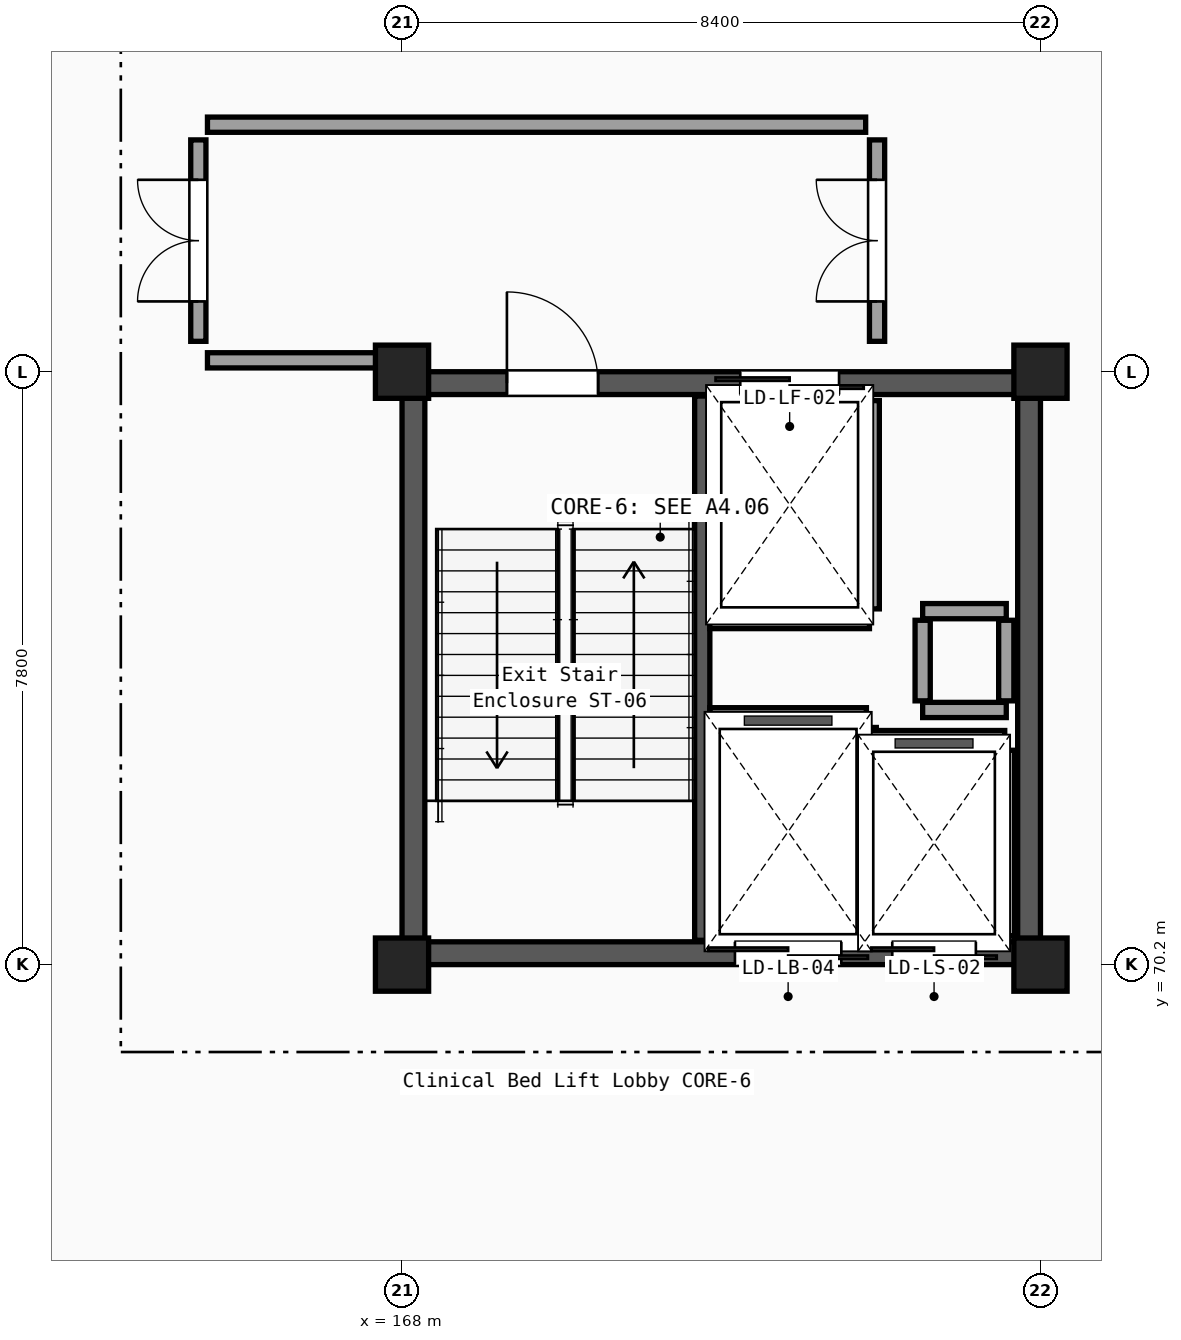
"""IFC4 building model, lengths in metres.
Left out: names, types, materials, properties, quantities, classifications, styles, units other than length and angle.
Written with IfcOpenShell. Run it as: python <this file> out.ifc"""

import sys

from ifc_helpers import new_model, si_unit, direction, frame, frame_2d, origin, origin_2d, place, context, subcontext, project, spatial, rectangle, i_section, extrude, element, fill, save


model = new_model("IFC4")
c1 = context("Model", 3, precision=1e-05, world=origin(), true_north=direction((0.0, 1.0)))
c2 = subcontext(c1, "Body", "Model", "MODEL_VIEW")
j1 = project(units=[si_unit("LENGTHUNIT", "METRE"), si_unit("PLANEANGLEUNIT", "RADIAN")], contexts=[c1])
p1 = place(None, origin())
s1 = spatial("IfcSite", under=j1, at=p1, CompositionType="ELEMENT")
p2 = place(p1, origin())
s2 = spatial("IfcBuilding", under=s1, at=p2, CompositionType="ELEMENT")
p3 = place(p2, frame((0.0, 0.0, -5.1)))
s3 = spatial("IfcBuildingStorey", under=s2, at=p3, CompositionType="ELEMENT", Elevation=-5.1)
for number, where, z_axis, x_axis in (
    (1, (168.0, 70.2, -0.22), (0.0, 0.0, 1.0), (1.0, 0.0, 0.0)),
    (2, (168.0, 78.0, -0.22), (0.0, 0.0, 1.0), (1.0, 0.0, 0.0)),
    (3, (176.4, 70.2, -0.22), (0.0, 0.0, 1.0), (1.0, 0.0, 0.0)),
    (4, (176.4, 78.0, -0.22), (0.0, 0.0, 1.0), (1.0, 0.0, 0.0)),
):
    element("IfcColumn", number, at=place(p3, frame(where, z_axis=z_axis, x_axis=x_axis)), inside=s3, PredefinedType="COLUMN", context=c2, shape_type="SweptSolid", body=[
        extrude(i_section(OverallWidth=0.3, OverallDepth=0.7, WebThickness=0.017, FlangeThickness=0.032, FilletRadius=0.027, at=origin_2d()), origin(), (0.0, 0.0, 1.0), 5.32),
    ])
p4 = place(p3, frame((168.0, 70.35, -0.22), z_axis=(0.0, 0.0, 1.0), x_axis=(1.0, 0.0, 0.0)))
e5 = element("IfcWall", 5, at=p4, inside=s3, PredefinedType="SHEAR", context=c2, shape_type="SweptSolid", body=[
    extrude(rectangle(XDim=8.4, YDim=0.3, at=frame_2d((4.2, 0.0))), origin(), (0.0, 0.0, 1.0), 5.07),
])
p5 = place(p4, frame((4.38, 0.0, 0.22)))
e6 = element("IfcOpeningElement", 6, at=p5, cuts=e5, PredefinedType="OPENING", context=c2, shape_type="SweptSolid", body=[
    extrude(rectangle(XDim=1.4, YDim=2.2, at=frame_2d((0.7, 1.1))), frame((0.0, 0.16, 0.0), z_axis=(0.0, -1.0, 0.0), x_axis=(1.0, 0.0, 0.0)), (0.0, 0.0, 1.0), 0.32),
])
p6 = place(p4, frame((6.45, 0.0, 0.22)))
e7 = element("IfcOpeningElement", 7, at=p6, cuts=e5, PredefinedType="OPENING", context=c2, shape_type="SweptSolid", body=[
    extrude(rectangle(XDim=1.1, YDim=2.15, at=frame_2d((0.55, 1.075))), frame((0.0, 0.16, 0.0), z_axis=(0.0, -1.0, 0.0), x_axis=(1.0, 0.0, 0.0)), (0.0, 0.0, 1.0), 0.32),
])
p7 = place(p3, frame((168.0, 77.85, -0.22), z_axis=(0.0, 0.0, 1.0), x_axis=(1.0, 0.0, 0.0)))
e8 = element("IfcWall", 8, at=p7, inside=s3, PredefinedType="SHEAR", context=c2, shape_type="SweptSolid", body=[
    extrude(rectangle(XDim=8.4, YDim=0.3, at=frame_2d((4.2, 0.0))), origin(), (0.0, 0.0, 1.0), 5.07),
])
p8 = place(p7, frame((1.38, 0.0, 0.22)))
e9 = element("IfcOpeningElement", 9, at=p8, cuts=e8, PredefinedType="OPENING", context=c2, shape_type="SweptSolid", body=[
    extrude(rectangle(XDim=1.2, YDim=2.15, at=frame_2d((0.6, 1.075))), frame((0.0, 0.16, 0.0), z_axis=(0.0, -1.0, 0.0), x_axis=(1.0, 0.0, 0.0)), (0.0, 0.0, 1.0), 0.32),
])
p9 = place(p7, frame((4.45, 0.0, 0.22)))
e10 = element("IfcOpeningElement", 10, at=p9, cuts=e8, PredefinedType="OPENING", context=c2, shape_type="SweptSolid", body=[
    extrude(rectangle(XDim=1.3, YDim=2.2, at=frame_2d((0.65, 1.1))), frame((0.0, 0.16, 0.0), z_axis=(0.0, -1.0, 0.0), x_axis=(1.0, 0.0, 0.0)), (0.0, 0.0, 1.0), 0.32),
])
for number, where, z_axis, x_axis in (
    (11, (168.15, 70.5, -0.22), (0.0, 0.0, 1.0), (0.0, 1.0, 0.0)),
    (12, (176.25, 70.5, -0.22), (0.0, 0.0, 1.0), (0.0, 1.0, 0.0)),
):
    element("IfcWall", number, at=place(p3, frame(where, z_axis=z_axis, x_axis=x_axis)), inside=s3, PredefinedType="SHEAR", context=c2, shape_type="SweptSolid", body=[
        extrude(rectangle(XDim=7.2, YDim=0.3, at=frame_2d((3.6, 0.0))), origin(), (0.0, 0.0, 1.0), 5.07),
    ])
p10 = place(p3, frame((171.95, 70.52, -0.22), z_axis=(0.0, 0.0, 1.0), x_axis=(0.0, 1.0, 0.0)))
e13 = element("IfcWall", 13, at=p10, inside=s3, PredefinedType="SHEAR", context=c2, shape_type="SweptSolid", body=[
    extrude(rectangle(XDim=7.16, YDim=0.2, at=frame_2d((3.58, 0.0))), origin(), (0.0, 0.0, 1.0), 5.07),
])
for number, where, z_axis, x_axis in (
    (14, (174.85, 73.55, 0.0), (0.0, 0.0, 1.0), (1.0, 0.0, 0.0)),
    (15, (174.85, 74.85, 0.0), (0.0, 0.0, 1.0), (1.0, 0.0, 0.0)),
):
    element("IfcWall", number, at=place(p3, frame(where, z_axis=z_axis, x_axis=x_axis)), inside=s3, PredefinedType="PARTITIONING", context=c2, shape_type="SweptSolid", body=[
        extrude(rectangle(XDim=1.1, YDim=0.2, at=frame_2d((0.55, 0.0))), origin(), (0.0, 0.0, 1.0), 4.33),
    ])
for number, where, z_axis, x_axis in (
    (16, (174.85, 73.67, 0.0), (0.0, 0.0, 1.0), (0.0, 1.0, 0.0)),
    (17, (175.95, 73.67, 0.0), (0.0, 0.0, 1.0), (0.0, 1.0, 0.0)),
):
    element("IfcWall", number, at=place(p3, frame(where, z_axis=z_axis, x_axis=x_axis)), inside=s3, PredefinedType="PARTITIONING", context=c2, shape_type="SweptSolid", body=[
        extrude(rectangle(XDim=1.06, YDim=0.2, at=frame_2d((0.53, 0.0))), origin(), (0.0, 0.0, 1.0), 4.33),
    ])
p11 = place(p3, frame((174.18, 74.88, 0.0), z_axis=(0.0, 0.0, 1.0), x_axis=(0.0, 1.0, 0.0)))
e18 = element("IfcWall", 18, at=p11, inside=s3, PredefinedType="PARTITIONING", context=c2, shape_type="SweptSolid", body=[
    extrude(rectangle(XDim=2.74, YDim=0.2, at=frame_2d((1.37, 0.0))), origin(), (0.0, 0.0, 1.0), 4.33),
])
p12 = place(p3, frame((172.05, 74.72, 0.0), z_axis=(0.0, 0.0, 1.0), x_axis=(1.0, 0.0, 0.0)))
e19 = element("IfcWall", 19, at=p12, inside=s3, PredefinedType="PARTITIONING", context=c2, shape_type="SweptSolid", body=[
    extrude(rectangle(XDim=2.1, YDim=0.2, at=frame_2d((1.05, 0.0))), origin(), (0.0, 0.0, 1.0), 4.33),
])
p13 = place(p3, frame((174.14, 70.58, 0.0), z_axis=(0.0, 0.0, 1.0), x_axis=(0.0, 1.0, 0.0)))
e20 = element("IfcWall", 20, at=p13, inside=s3, PredefinedType="PARTITIONING", context=c2, shape_type="SweptSolid", body=[
    extrude(rectangle(XDim=2.74, YDim=0.2, at=frame_2d((1.37, 0.0))), origin(), (0.0, 0.0, 1.0), 4.33),
])
p14 = place(p3, frame((172.05, 73.48, 0.0), z_axis=(0.0, 0.0, 1.0), x_axis=(1.0, 0.0, 0.0)))
e21 = element("IfcWall", 21, at=p14, inside=s3, PredefinedType="PARTITIONING", context=c2, shape_type="SweptSolid", body=[
    extrude(rectangle(XDim=2.06, YDim=0.2, at=frame_2d((1.03, 0.0))), origin(), (0.0, 0.0, 1.0), 4.33),
])
p15 = place(p3, frame((175.96, 70.58, 0.0), z_axis=(0.0, 0.0, 1.0), x_axis=(0.0, 1.0, 0.0)))
e22 = element("IfcWall", 22, at=p15, inside=s3, PredefinedType="PARTITIONING", context=c2, shape_type="SweptSolid", body=[
    extrude(rectangle(XDim=2.44, YDim=0.2, at=frame_2d((1.22, 0.0))), origin(), (0.0, 0.0, 1.0), 4.33),
])
p16 = place(p3, frame((174.07, 73.18, 0.0), z_axis=(0.0, 0.0, 1.0), x_axis=(1.0, 0.0, 0.0)))
e23 = element("IfcWall", 23, at=p16, inside=s3, PredefinedType="PARTITIONING", context=c2, shape_type="SweptSolid", body=[
    extrude(rectangle(XDim=1.86, YDim=0.2, at=frame_2d((0.93, 0.0))), origin(), (0.0, 0.0, 1.0), 4.33),
])
p17 = place(p3, frame((165.44, 78.15, 0.0), z_axis=(0.0, 0.0, 1.0), x_axis=(1.0, 0.0, 0.0)))
e24 = element("IfcWall", 24, at=p17, inside=s3, PredefinedType="PARTITIONING", context=c2, shape_type="SweptSolid", body=[
    extrude(rectangle(XDim=2.44, YDim=0.2, at=frame_2d((1.22, 0.0))), origin(), (0.0, 0.0, 1.0), 4.33),
])
p18 = place(p3, frame((165.44, 81.25, 0.0), z_axis=(0.0, 0.0, 1.0), x_axis=(1.0, 0.0, 0.0)))
e25 = element("IfcWall", 25, at=p18, inside=s3, PredefinedType="PARTITIONING", context=c2, shape_type="SweptSolid", body=[
    extrude(rectangle(XDim=8.66, YDim=0.2, at=frame_2d((4.33, 0.0))), origin(), (0.0, 0.0, 1.0), 4.33),
])
p19 = place(p3, frame((165.32, 78.4, 0.0), z_axis=(0.0, 0.0, 1.0), x_axis=(0.0, 1.0, 0.0)))
e26 = element("IfcWall", 26, at=p19, inside=s3, PredefinedType="PARTITIONING", context=c2, shape_type="SweptSolid", body=[
    extrude(rectangle(XDim=2.65, YDim=0.2, at=frame_2d((1.325, 0.0))), origin(), (0.0, 0.0, 1.0), 4.33),
])
p20 = place(p19, frame((0.525, 0.0, 0.0)))
e27 = element("IfcOpeningElement", 27, at=p20, cuts=e26, PredefinedType="OPENING", context=c2, shape_type="SweptSolid", body=[
    extrude(rectangle(XDim=1.6, YDim=2.2, at=frame_2d((0.8, 1.1))), frame((0.0, 0.11, 0.0), z_axis=(0.0, -1.0, 0.0), x_axis=(1.0, 0.0, 0.0)), (0.0, 0.0, 1.0), 0.22),
])
p21 = place(p3, frame((174.25, 78.4, 0.0), z_axis=(0.0, 0.0, 1.0), x_axis=(0.0, 1.0, 0.0)))
e28 = element("IfcWall", 28, at=p21, inside=s3, PredefinedType="PARTITIONING", context=c2, shape_type="SweptSolid", body=[
    extrude(rectangle(XDim=2.65, YDim=0.2, at=frame_2d((1.325, 0.0))), origin(), (0.0, 0.0, 1.0), 4.33),
])
p22 = place(p21, frame((0.525, 0.0, 0.0)))
e29 = element("IfcOpeningElement", 29, at=p22, cuts=e28, PredefinedType="OPENING", context=c2, shape_type="SweptSolid", body=[
    extrude(rectangle(XDim=1.6, YDim=2.2, at=frame_2d((0.8, 1.1))), frame((0.0, 0.11, 0.0), z_axis=(0.0, -1.0, 0.0), x_axis=(1.0, 0.0, 0.0)), (0.0, 0.0, 1.0), 0.22),
])
p23 = place(p8, origin())
e30 = element("IfcDoor", 30, at=p23, inside=s3, OperationType="SINGLE_SWING_LEFT", PredefinedType="DOOR", context=c2, shape_type="SweptSolid", body=[
    extrude(rectangle(XDim=1.2, YDim=2.15, at=frame_2d((0.6, 1.075))), frame((0.0, 0.025, 0.0), z_axis=(0.0, -1.0, 0.0), x_axis=(1.0, 0.0, 0.0)), (0.0, 0.0, 1.0), 0.05),
])
fill(e9, e30)
p24 = place(p9, origin())
e31 = element("IfcDoor", 31, at=p24, inside=s3, OperationType="DOUBLE_DOOR_SLIDING", PredefinedType="DOOR", context=c2, shape_type="SweptSolid", body=[
    extrude(rectangle(XDim=1.3, YDim=2.2, at=frame_2d((0.65, 1.1))), frame((0.0, 0.025, 0.0), z_axis=(0.0, -1.0, 0.0), x_axis=(1.0, 0.0, 0.0)), (0.0, 0.0, 1.0), 0.05),
])
fill(e10, e31)
p25 = place(p5, origin())
e32 = element("IfcDoor", 32, at=p25, inside=s3, OperationType="DOUBLE_DOOR_SLIDING", PredefinedType="DOOR", context=c2, shape_type="SweptSolid", body=[
    extrude(rectangle(XDim=1.4, YDim=2.2, at=frame_2d((0.7, 1.1))), frame((0.0, 0.025, 0.0), z_axis=(0.0, -1.0, 0.0), x_axis=(1.0, 0.0, 0.0)), (0.0, 0.0, 1.0), 0.05),
])
fill(e6, e32)
p26 = place(p6, origin())
e33 = element("IfcDoor", 33, at=p26, inside=s3, OperationType="DOUBLE_DOOR_SLIDING", PredefinedType="DOOR", context=c2, shape_type="SweptSolid", body=[
    extrude(rectangle(XDim=1.1, YDim=2.15, at=frame_2d((0.55, 1.075))), frame((0.0, 0.025, 0.0), z_axis=(0.0, -1.0, 0.0), x_axis=(1.0, 0.0, 0.0)), (0.0, 0.0, 1.0), 0.05),
])
fill(e7, e33)
p27 = place(p20, origin())
e34 = element("IfcDoor", 34, at=p27, inside=s3, OperationType="DOUBLE_DOOR_SINGLE_SWING", PredefinedType="DOOR", context=c2, shape_type="SweptSolid", body=[
    extrude(rectangle(XDim=1.6, YDim=2.2, at=frame_2d((0.8, 1.1))), frame((0.0, 0.025, 0.0), z_axis=(0.0, -1.0, 0.0), x_axis=(1.0, 0.0, 0.0)), (0.0, 0.0, 1.0), 0.05),
])
fill(e27, e34)
p28 = place(p22, origin())
e35 = element("IfcDoor", 35, at=p28, inside=s3, OperationType="DOUBLE_DOOR_SINGLE_SWING", PredefinedType="DOOR", context=c2, shape_type="SweptSolid", body=[
    extrude(rectangle(XDim=1.6, YDim=2.2, at=frame_2d((0.8, 1.1))), frame((0.0, 0.025, 0.0), z_axis=(0.0, -1.0, 0.0), x_axis=(1.0, 0.0, 0.0)), (0.0, 0.0, 1.0), 0.05),
])
fill(e29, e35)
save(model, sys.argv[1])
